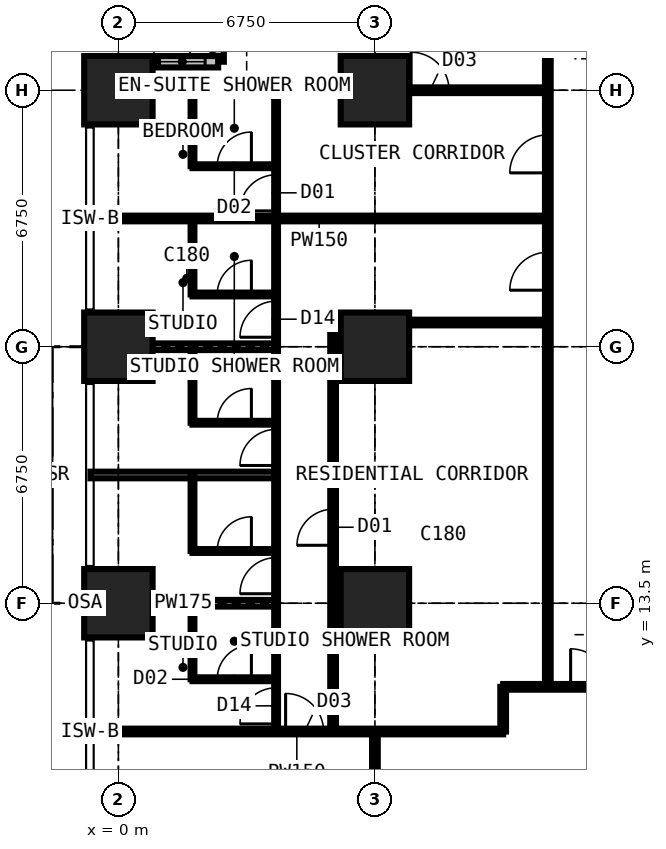
"""IFC4 building model, lengths in metres.
Left out: names, types, materials, properties, quantities, classifications, styles, units other than length and angle.
Written with IfcOpenShell. Run it as: python <this file> out.ifc"""

import sys

from ifc_helpers import new_model, si_unit, direction, frame, frame_2d, origin, origin_2d, place, context, subcontext, project, spatial, rectangle, extrude, element, fill, save


model = new_model("IFC4")
c1 = context("Model", 3, precision=1e-05, world=origin(), true_north=direction((0.0, 1.0)))
c2 = subcontext(c1, "Body", "Model", "MODEL_VIEW")
j1 = project(units=[si_unit("LENGTHUNIT", "METRE"), si_unit("PLANEANGLEUNIT", "RADIAN")], contexts=[c1])
p1 = place(None, origin())
s1 = spatial("IfcSite", under=j1, at=p1, CompositionType="ELEMENT")
p2 = place(p1, origin())
s2 = spatial("IfcBuilding", under=s1, at=p2, CompositionType="ELEMENT")
p3 = place(p2, frame((0.0, 0.0, 105.3)))
s3 = spatial("IfcBuildingStorey", under=s2, at=p3, CompositionType="ELEMENT", Elevation=105.3)
for number, where, z_axis, x_axis in (
    (1, (0.0, 13.5, 0.0), (0.0, 0.0, 1.0), (1.0, 0.0, 0.0)),
    (2, (0.0, 20.25, 0.0), (0.0, 0.0, 1.0), (1.0, 0.0, 0.0)),
    (3, (0.0, 27.0, 0.0), (0.0, 0.0, 1.0), (1.0, 0.0, 0.0)),
    (4, (6.75, 13.5, 0.0), (0.0, 0.0, 1.0), (1.0, 0.0, 0.0)),
    (5, (6.75, 20.25, 0.0), (0.0, 0.0, 1.0), (1.0, 0.0, 0.0)),
    (6, (6.75, 27.0, 0.0), (0.0, 0.0, 1.0), (1.0, 0.0, 0.0)),
):
    element("IfcColumn", number, at=place(p3, frame(where, z_axis=z_axis, x_axis=x_axis)), inside=s3, PredefinedType="COLUMN", context=c2, shape_type="SweptSolid", body=[
        extrude(rectangle(XDim=1.8, YDim=1.8, at=origin_2d()), origin(), (0.0, 0.0, 1.0), 3.6),
    ])
p4 = place(p3, frame((2.625, 31.125, 0.0), z_axis=(0.0, 0.0, 1.0), x_axis=(0.0, -1.0, 0.0)))
e7 = element("IfcWall", 7, at=p4, inside=s3, PredefinedType="SOLIDWALL", context=c2, shape_type="SweptSolid", body=[
    extrude(rectangle(XDim=3.375, YDim=0.3, at=frame_2d((1.688, 0.0))), origin(), (0.0, 0.0, 1.0), 3.375),
])
p5 = place(p4, frame((0.788, 0.0, 0.6)))
e8 = element("IfcOpeningElement", 8, at=p5, cuts=e7, PredefinedType="OPENING", context=c2, shape_type="SweptSolid", body=[
    extrude(rectangle(XDim=1.8, YDim=2.1, at=frame_2d((0.9, 1.05))), frame((0.0, 0.16, 0.0), z_axis=(0.0, -1.0, 0.0), x_axis=(1.0, 0.0, 0.0)), (0.0, 0.0, 1.0), 0.32),
])
p6 = place(p3, frame((2.625, 27.75, 0.0), z_axis=(0.0, 0.0, 1.0), x_axis=(-1.0, 0.0, 0.0)))
e9 = element("IfcWall", 9, at=p6, inside=s3, PredefinedType="SOLIDWALL", context=c2, shape_type="SweptSolid", body=[
    extrude(rectangle(XDim=3.375, YDim=0.3, at=frame_2d((1.688, 0.0))), origin(), (0.0, 0.0, 1.0), 3.375),
])
p7 = place(p6, frame((0.343, 0.0, 0.9)))
e10 = element("IfcOpeningElement", 10, at=p7, cuts=e9, PredefinedType="OPENING", context=c2, shape_type="SweptSolid", body=[
    extrude(rectangle(XDim=1.2, YDim=1.8, at=frame_2d((0.6, 0.9))), frame((0.0, 0.16, 0.0), z_axis=(0.0, -1.0, 0.0), x_axis=(1.0, 0.0, 0.0)), (0.0, 0.0, 1.0), 0.32),
])
p8 = place(p3, frame((-0.734, 10.125, 0.0), z_axis=(0.0, 0.0, 1.0), x_axis=(1.0, 0.0, 0.0)))
e11 = element("IfcWall", 11, at=p8, inside=s3, PredefinedType="PARTITIONING", context=c2, shape_type="SweptSolid", body=[
    extrude(rectangle(XDim=10.859, YDim=0.15, at=frame_2d((5.429, 0.0))), origin(), (0.0, 0.0, 1.0), 3.375),
])
p9 = place(p8, frame((5.134, 0.0, 0.0)))
e12 = element("IfcOpeningElement", 12, at=p9, cuts=e11, PredefinedType="OPENING", context=c2, shape_type="SweptSolid", body=[
    extrude(rectangle(XDim=1.0, YDim=2.2, at=frame_2d((0.5, 1.1))), frame((0.0, 0.085, 0.0), z_axis=(0.0, -1.0, 0.0), x_axis=(1.0, 0.0, 0.0)), (0.0, 0.0, 1.0), 0.17),
])
p10 = place(p3, frame((-0.734, 13.5, 0.0), z_axis=(0.0, 0.0, 1.0), x_axis=(1.0, 0.0, 0.0)))
e13 = element("IfcWall", 13, at=p10, inside=s3, PredefinedType="PARTITIONING", context=c2, shape_type="SweptSolid", body=[
    extrude(rectangle(XDim=4.884, YDim=0.175, at=frame_2d((2.442, 0.0))), origin(), (0.0, 0.0, 1.0), 2.61),
])
p11 = place(p3, frame((-0.734, 16.875, 0.0), z_axis=(0.0, 0.0, 1.0), x_axis=(1.0, 0.0, 0.0)))
e14 = element("IfcWall", 14, at=p11, inside=s3, PredefinedType="PARTITIONING", context=c2, shape_type="SweptSolid", body=[
    extrude(rectangle(XDim=4.884, YDim=0.175, at=frame_2d((2.442, 0.0))), origin(), (0.0, 0.0, 1.0), 3.375),
])
p12 = place(p3, frame((-0.734, 20.25, 0.0), z_axis=(0.0, 0.0, 1.0), x_axis=(1.0, 0.0, 0.0)))
e15 = element("IfcWall", 15, at=p12, inside=s3, PredefinedType="PARTITIONING", context=c2, shape_type="SweptSolid", body=[
    extrude(rectangle(XDim=4.884, YDim=0.175, at=frame_2d((2.442, 0.0))), origin(), (0.0, 0.0, 1.0), 2.61),
])
p13 = place(p3, frame((-0.734, 23.625, 0.0), z_axis=(0.0, 0.0, 1.0), x_axis=(1.0, 0.0, 0.0)))
e16 = element("IfcWall", 16, at=p13, inside=s3, PredefinedType="PARTITIONING", context=c2, shape_type="SweptSolid", body=[
    extrude(rectangle(XDim=12.034, YDim=0.15, at=frame_2d((6.017, 0.0))), origin(), (0.0, 0.0, 1.0), 3.375),
])
p14 = place(p3, frame((-0.734, 27.0, 0.0), z_axis=(0.0, 0.0, 1.0), x_axis=(1.0, 0.0, 0.0)))
e17 = element("IfcWall", 17, at=p14, inside=s3, PredefinedType="PARTITIONING", context=c2, shape_type="SweptSolid", body=[
    extrude(rectangle(XDim=12.034, YDim=0.15, at=frame_2d((6.017, 0.0))), origin(), (0.0, 0.0, 1.0), 2.806),
])
p15 = place(p14, frame((8.434, 0.0, 0.0)))
e18 = element("IfcOpeningElement", 18, at=p15, cuts=e17, PredefinedType="OPENING", context=c2, shape_type="SweptSolid", body=[
    extrude(rectangle(XDim=1.0, YDim=2.2, at=frame_2d((0.5, 1.1))), frame((0.0, 0.085, 0.0), z_axis=(0.0, -1.0, 0.0), x_axis=(1.0, 0.0, 0.0)), (0.0, 0.0, 1.0), 0.17),
])
p16 = place(p3, frame((1.95, 11.5, 0.0), z_axis=(0.0, 0.0, 1.0), x_axis=(0.0, 1.0, 0.0)))
e19 = element("IfcWall", 19, at=p16, inside=s3, PredefinedType="PARTITIONING", context=c2, shape_type="SweptSolid", body=[
    extrude(rectangle(XDim=2.0, YDim=0.1, at=frame_2d((1.0, 0.0))), origin(), (0.0, 0.0, 1.0), 3.375),
])
p17 = place(p3, frame((1.95, 11.5, 0.0), z_axis=(0.0, 0.0, 1.0), x_axis=(1.0, 0.0, 0.0)))
e20 = element("IfcWall", 20, at=p17, inside=s3, PredefinedType="PARTITIONING", context=c2, shape_type="SweptSolid", body=[
    extrude(rectangle(XDim=2.2, YDim=0.1, at=frame_2d((1.1, 0.0))), origin(), (0.0, 0.0, 1.0), 3.375),
])
p18 = place(p17, frame((0.65, 0.0, 0.0)))
e21 = element("IfcOpeningElement", 21, at=p18, cuts=e20, PredefinedType="OPENING", context=c2, shape_type="SweptSolid", body=[
    extrude(rectangle(XDim=0.9, YDim=2.2, at=frame_2d((0.45, 1.1))), frame((0.0, 0.06, 0.0), z_axis=(0.0, -1.0, 0.0), x_axis=(1.0, 0.0, 0.0)), (0.0, 0.0, 1.0), 0.12),
])
p19 = place(p3, frame((1.95, 14.875, 0.0), z_axis=(0.0, 0.0, 1.0), x_axis=(0.0, 1.0, 0.0)))
e22 = element("IfcWall", 22, at=p19, inside=s3, PredefinedType="PARTITIONING", context=c2, shape_type="SweptSolid", body=[
    extrude(rectangle(XDim=2.0, YDim=0.1, at=frame_2d((1.0, 0.0))), origin(), (0.0, 0.0, 1.0), 3.375),
])
p20 = place(p3, frame((1.95, 14.875, 0.0), z_axis=(0.0, 0.0, 1.0), x_axis=(1.0, 0.0, 0.0)))
e23 = element("IfcWall", 23, at=p20, inside=s3, PredefinedType="PARTITIONING", context=c2, shape_type="SweptSolid", body=[
    extrude(rectangle(XDim=2.2, YDim=0.1, at=frame_2d((1.1, 0.0))), origin(), (0.0, 0.0, 1.0), 3.375),
])
p21 = place(p20, frame((0.65, 0.0, 0.0)))
e24 = element("IfcOpeningElement", 24, at=p21, cuts=e23, PredefinedType="OPENING", context=c2, shape_type="SweptSolid", body=[
    extrude(rectangle(XDim=0.9, YDim=2.2, at=frame_2d((0.45, 1.1))), frame((0.0, 0.06, 0.0), z_axis=(0.0, -1.0, 0.0), x_axis=(1.0, 0.0, 0.0)), (0.0, 0.0, 1.0), 0.12),
])
p22 = place(p3, frame((1.95, 18.25, 0.0), z_axis=(0.0, 0.0, 1.0), x_axis=(0.0, 1.0, 0.0)))
e25 = element("IfcWall", 25, at=p22, inside=s3, PredefinedType="PARTITIONING", context=c2, shape_type="SweptSolid", body=[
    extrude(rectangle(XDim=2.0, YDim=0.1, at=frame_2d((1.0, 0.0))), origin(), (0.0, 0.0, 1.0), 3.375),
])
p23 = place(p3, frame((1.95, 18.25, 0.0), z_axis=(0.0, 0.0, 1.0), x_axis=(1.0, 0.0, 0.0)))
e26 = element("IfcWall", 26, at=p23, inside=s3, PredefinedType="PARTITIONING", context=c2, shape_type="SweptSolid", body=[
    extrude(rectangle(XDim=2.2, YDim=0.1, at=frame_2d((1.1, 0.0))), origin(), (0.0, 0.0, 1.0), 3.375),
])
p24 = place(p23, frame((0.65, 0.0, 0.0)))
e27 = element("IfcOpeningElement", 27, at=p24, cuts=e26, PredefinedType="OPENING", context=c2, shape_type="SweptSolid", body=[
    extrude(rectangle(XDim=0.9, YDim=2.2, at=frame_2d((0.45, 1.1))), frame((0.0, 0.06, 0.0), z_axis=(0.0, -1.0, 0.0), x_axis=(1.0, 0.0, 0.0)), (0.0, 0.0, 1.0), 0.12),
])
p25 = place(p3, frame((1.95, 21.625, 0.0), z_axis=(0.0, 0.0, 1.0), x_axis=(0.0, 1.0, 0.0)))
e28 = element("IfcWall", 28, at=p25, inside=s3, PredefinedType="PARTITIONING", context=c2, shape_type="SweptSolid", body=[
    extrude(rectangle(XDim=2.0, YDim=0.1, at=frame_2d((1.0, 0.0))), origin(), (0.0, 0.0, 1.0), 3.375),
])
p26 = place(p3, frame((1.95, 21.625, 0.0), z_axis=(0.0, 0.0, 1.0), x_axis=(1.0, 0.0, 0.0)))
e29 = element("IfcWall", 29, at=p26, inside=s3, PredefinedType="PARTITIONING", context=c2, shape_type="SweptSolid", body=[
    extrude(rectangle(XDim=2.2, YDim=0.1, at=frame_2d((1.1, 0.0))), origin(), (0.0, 0.0, 1.0), 3.375),
])
p27 = place(p26, frame((0.65, 0.0, 0.0)))
e30 = element("IfcOpeningElement", 30, at=p27, cuts=e29, PredefinedType="OPENING", context=c2, shape_type="SweptSolid", body=[
    extrude(rectangle(XDim=0.9, YDim=2.2, at=frame_2d((0.45, 1.1))), frame((0.0, 0.06, 0.0), z_axis=(0.0, -1.0, 0.0), x_axis=(1.0, 0.0, 0.0)), (0.0, 0.0, 1.0), 0.12),
])
p28 = place(p3, frame((1.95, 25.0, 0.0), z_axis=(0.0, 0.0, 1.0), x_axis=(0.0, 1.0, 0.0)))
e31 = element("IfcWall", 31, at=p28, inside=s3, PredefinedType="PARTITIONING", context=c2, shape_type="SweptSolid", body=[
    extrude(rectangle(XDim=2.0, YDim=0.1, at=frame_2d((1.0, 0.0))), origin(), (0.0, 0.0, 1.0), 3.375),
])
p29 = place(p3, frame((1.95, 25.0, 0.0), z_axis=(0.0, 0.0, 1.0), x_axis=(1.0, 0.0, 0.0)))
e32 = element("IfcWall", 32, at=p29, inside=s3, PredefinedType="PARTITIONING", context=c2, shape_type="SweptSolid", body=[
    extrude(rectangle(XDim=2.2, YDim=0.1, at=frame_2d((1.1, 0.0))), origin(), (0.0, 0.0, 1.0), 3.375),
])
p30 = place(p29, frame((0.65, 0.0, 0.0)))
e33 = element("IfcOpeningElement", 33, at=p30, cuts=e32, PredefinedType="OPENING", context=c2, shape_type="SweptSolid", body=[
    extrude(rectangle(XDim=0.9, YDim=2.2, at=frame_2d((0.45, 1.1))), frame((0.0, 0.06, 0.0), z_axis=(0.0, -1.0, 0.0), x_axis=(1.0, 0.0, 0.0)), (0.0, 0.0, 1.0), 0.12),
])
p31 = place(p3, frame((4.15, 10.125, 0.0), z_axis=(0.0, 0.0, 1.0), x_axis=(0.0, 1.0, 0.0)))
e34 = element("IfcWall", 34, at=p31, inside=s3, PredefinedType="PARTITIONING", context=c2, shape_type="SweptSolid", body=[
    extrude(rectangle(XDim=16.875, YDim=0.1, at=frame_2d((8.438, 0.0))), origin(), (0.0, 0.0, 1.0), 3.375),
])
p32 = place(p31, frame((13.7, 0.0, 0.0)))
e35 = element("IfcOpeningElement", 35, at=p32, cuts=e34, PredefinedType="OPENING", context=c2, shape_type="SweptSolid", body=[
    extrude(rectangle(XDim=0.95, YDim=2.2, at=frame_2d((0.475, 1.1))), frame((0.0, 0.06, 0.0), z_axis=(0.0, -1.0, 0.0), x_axis=(1.0, 0.0, 0.0)), (0.0, 0.0, 1.0), 0.12),
])
p33 = place(p31, frame((0.2, 0.0, 0.0)))
e36 = element("IfcOpeningElement", 36, at=p33, cuts=e34, PredefinedType="OPENING", context=c2, shape_type="SweptSolid", body=[
    extrude(rectangle(XDim=0.95, YDim=2.2, at=frame_2d((0.475, 1.1))), frame((0.0, 0.06, 0.0), z_axis=(0.0, -1.0, 0.0), x_axis=(1.0, 0.0, 0.0)), (0.0, 0.0, 1.0), 0.12),
])
p34 = place(p31, frame((3.625, 0.0, 0.0)))
e37 = element("IfcOpeningElement", 37, at=p34, cuts=e34, PredefinedType="OPENING", context=c2, shape_type="SweptSolid", body=[
    extrude(rectangle(XDim=0.95, YDim=2.2, at=frame_2d((0.475, 1.1))), frame((0.0, 0.06, 0.0), z_axis=(0.0, -1.0, 0.0), x_axis=(1.0, 0.0, 0.0)), (0.0, 0.0, 1.0), 0.12),
])
p35 = place(p31, frame((7.0, 0.0, 0.0)))
e38 = element("IfcOpeningElement", 38, at=p35, cuts=e34, PredefinedType="OPENING", context=c2, shape_type="SweptSolid", body=[
    extrude(rectangle(XDim=0.95, YDim=2.2, at=frame_2d((0.475, 1.1))), frame((0.0, 0.06, 0.0), z_axis=(0.0, -1.0, 0.0), x_axis=(1.0, 0.0, 0.0)), (0.0, 0.0, 1.0), 0.12),
])
p36 = place(p31, frame((10.375, 0.0, 0.0)))
e39 = element("IfcOpeningElement", 39, at=p36, cuts=e34, PredefinedType="OPENING", context=c2, shape_type="SweptSolid", body=[
    extrude(rectangle(XDim=0.95, YDim=2.2, at=frame_2d((0.475, 1.1))), frame((0.0, 0.06, 0.0), z_axis=(0.0, -1.0, 0.0), x_axis=(1.0, 0.0, 0.0)), (0.0, 0.0, 1.0), 0.12),
])
p37 = place(p3, frame((5.65, 10.125, 0.0), z_axis=(0.0, 0.0, 1.0), x_axis=(0.0, 1.0, 0.0)))
e40 = element("IfcWall", 40, at=p37, inside=s3, PredefinedType="PARTITIONING", context=c2, shape_type="SweptSolid", body=[
    extrude(rectangle(XDim=10.762, YDim=0.15, at=frame_2d((5.381, 0.0))), origin(), (0.0, 0.0, 1.0), 3.375),
])
p38 = place(p37, frame((4.9, 0.0, 0.0)))
e41 = element("IfcOpeningElement", 41, at=p38, cuts=e40, PredefinedType="OPENING", context=c2, shape_type="SweptSolid", body=[
    extrude(rectangle(XDim=0.95, YDim=2.2, at=frame_2d((0.475, 1.1))), frame((0.0, 0.085, 0.0), z_axis=(0.0, -1.0, 0.0), x_axis=(1.0, 0.0, 0.0)), (0.0, 0.0, 1.0), 0.17),
])
p39 = place(p3, frame((5.65, 20.887, 0.0), z_axis=(0.0, 0.0, 1.0), x_axis=(1.0, 0.0, 0.0)))
e42 = element("IfcWall", 42, at=p39, inside=s3, PredefinedType="PARTITIONING", context=c2, shape_type="SweptSolid", body=[
    extrude(rectangle(XDim=5.65, YDim=0.15, at=frame_2d((2.825, 0.0))), origin(), (0.0, 0.0, 1.0), 3.375),
])
p40 = place(p3, frame((6.75, -0.734, 0.0), z_axis=(0.0, 0.0, 1.0), x_axis=(0.0, 1.0, 0.0)))
e43 = element("IfcWall", 43, at=p40, inside=s3, PredefinedType="PARTITIONING", context=c2, shape_type="SweptSolid", body=[
    extrude(rectangle(XDim=10.859, YDim=0.15, at=frame_2d((5.429, 0.0))), origin(), (0.0, 0.0, 1.0), 2.877),
])
p41 = place(p3, frame((10.125, 10.125, 0.0), z_axis=(0.0, 0.0, 1.0), x_axis=(0.0, 1.0, 0.0)))
e44 = element("IfcWall", 44, at=p41, inside=s3, PredefinedType="PARTITIONING", context=c2, shape_type="SweptSolid", body=[
    extrude(rectangle(XDim=1.175, YDim=0.15, at=frame_2d((0.587, 0.0))), origin(), (0.0, 0.0, 1.0), 3.375),
])
p42 = place(p3, frame((10.125, 11.3, 0.0), z_axis=(0.0, 0.0, 1.0), x_axis=(1.0, 0.0, 0.0)))
e45 = element("IfcWall", 45, at=p42, inside=s3, PredefinedType="PARTITIONING", context=c2, shape_type="SweptSolid", body=[
    extrude(rectangle(XDim=20.675, YDim=0.15, at=frame_2d((10.337, 0.0))), origin(), (0.0, 0.0, 1.0), 3.375),
])
p43 = place(p42, frame((1.775, 0.0, 0.0)))
e46 = element("IfcOpeningElement", 46, at=p43, cuts=e45, PredefinedType="OPENING", context=c2, shape_type="SweptSolid", body=[
    extrude(rectangle(XDim=1.0, YDim=2.2, at=frame_2d((0.5, 1.1))), frame((0.0, 0.085, 0.0), z_axis=(0.0, -1.0, 0.0), x_axis=(1.0, 0.0, 0.0)), (0.0, 0.0, 1.0), 0.17),
])
p44 = place(p42, frame((11.312, 0.0, 0.0)))
e47 = element("IfcOpeningElement", 47, at=p44, cuts=e45, PredefinedType="OPENING", context=c2, shape_type="SweptSolid", body=[
    extrude(rectangle(XDim=1.0, YDim=2.2, at=frame_2d((0.5, 1.1))), frame((0.0, 0.085, 0.0), z_axis=(0.0, -1.0, 0.0), x_axis=(1.0, 0.0, 0.0)), (0.0, 0.0, 1.0), 0.17),
])
p45 = place(p3, frame((11.3, 11.3, 0.0), z_axis=(0.0, 0.0, 1.0), x_axis=(0.0, 1.0, 0.0)))
e48 = element("IfcWall", 48, at=p45, inside=s3, PredefinedType="PARTITIONING", context=c2, shape_type="SweptSolid", body=[
    extrude(rectangle(XDim=19.3, YDim=0.15, at=frame_2d((9.65, 0.0))), origin(), (0.0, 0.0, 1.0), 3.375),
])
p46 = place(p45, frame((13.525, 0.0, 0.0)))
e49 = element("IfcOpeningElement", 49, at=p46, cuts=e48, PredefinedType="OPENING", context=c2, shape_type="SweptSolid", body=[
    extrude(rectangle(XDim=1.0, YDim=2.2, at=frame_2d((0.5, 1.1))), frame((0.0, 0.085, 0.0), z_axis=(0.0, -1.0, 0.0), x_axis=(1.0, 0.0, 0.0)), (0.0, 0.0, 1.0), 0.17),
])
p47 = place(p45, frame((10.438, 0.0, 0.0)))
e50 = element("IfcOpeningElement", 50, at=p47, cuts=e48, PredefinedType="OPENING", context=c2, shape_type="SweptSolid", body=[
    extrude(rectangle(XDim=1.0, YDim=2.2, at=frame_2d((0.5, 1.1))), frame((0.0, 0.085, 0.0), z_axis=(0.0, -1.0, 0.0), x_axis=(1.0, 0.0, 0.0)), (0.0, 0.0, 1.0), 0.17),
])
p48 = place(p7, origin())
e51 = element("IfcWindow", 51, at=p48, inside=s3, PartitioningType="SINGLE_PANEL", PredefinedType="WINDOW", context=c2, shape_type="SweptSolid", body=[
    extrude(rectangle(XDim=1.2, YDim=1.8, at=frame_2d((0.6, 0.9))), frame((0.0, 0.03, 0.0), z_axis=(0.0, -1.0, 0.0), x_axis=(1.0, 0.0, 0.0)), (0.0, 0.0, 1.0), 0.06),
])
fill(e10, e51)
p49 = place(p9, origin())
e52 = element("IfcDoor", 52, at=p49, inside=s3, OperationType="SINGLE_SWING_LEFT", PredefinedType="DOOR", context=c2, shape_type="SweptSolid", body=[
    extrude(rectangle(XDim=1.0, YDim=2.2, at=frame_2d((0.5, 1.1))), frame((0.0, 0.025, 0.0), z_axis=(0.0, -1.0, 0.0), x_axis=(1.0, 0.0, 0.0)), (0.0, 0.0, 1.0), 0.05),
])
fill(e12, e52)
p50 = place(p43, origin())
e53 = element("IfcDoor", 53, at=p50, inside=s3, OperationType="SINGLE_SWING_LEFT", PredefinedType="DOOR", context=c2, shape_type="SweptSolid", body=[
    extrude(rectangle(XDim=1.0, YDim=2.2, at=frame_2d((0.5, 1.1))), frame((0.0, 0.025, 0.0), z_axis=(0.0, -1.0, 0.0), x_axis=(1.0, 0.0, 0.0)), (0.0, 0.0, 1.0), 0.05),
])
fill(e46, e53)
p51 = place(p15, origin())
e54 = element("IfcDoor", 54, at=p51, inside=s3, OperationType="SINGLE_SWING_LEFT", PredefinedType="DOOR", context=c2, shape_type="SweptSolid", body=[
    extrude(rectangle(XDim=1.0, YDim=2.2, at=frame_2d((0.5, 1.1))), frame((0.0, 0.025, 0.0), z_axis=(0.0, -1.0, 0.0), x_axis=(1.0, 0.0, 0.0)), (0.0, 0.0, 1.0), 0.05),
])
fill(e18, e54)
p52 = place(p32, origin())
e55 = element("IfcDoor", 55, at=p52, inside=s3, OperationType="SINGLE_SWING_LEFT", PredefinedType="DOOR", context=c2, shape_type="SweptSolid", body=[
    extrude(rectangle(XDim=0.95, YDim=2.2, at=frame_2d((0.475, 1.1))), frame((0.0, 0.025, 0.0), z_axis=(0.0, -1.0, 0.0), x_axis=(1.0, 0.0, 0.0)), (0.0, 0.0, 1.0), 0.05),
])
fill(e35, e55)
p53 = place(p30, origin())
e56 = element("IfcDoor", 56, at=p53, inside=s3, OperationType="SINGLE_SWING_RIGHT", PredefinedType="DOOR", context=c2, shape_type="SweptSolid", body=[
    extrude(rectangle(XDim=0.9, YDim=2.2, at=frame_2d((0.45, 1.1))), frame((0.0, 0.025, 0.0), z_axis=(0.0, -1.0, 0.0), x_axis=(1.0, 0.0, 0.0)), (0.0, 0.0, 1.0), 0.05),
])
fill(e33, e56)
p54 = place(p46, origin())
e57 = element("IfcDoor", 57, at=p54, inside=s3, OperationType="SINGLE_SWING_LEFT", PredefinedType="DOOR", context=c2, shape_type="SweptSolid", body=[
    extrude(rectangle(XDim=1.0, YDim=2.2, at=frame_2d((0.5, 1.1))), frame((0.0, 0.025, 0.0), z_axis=(0.0, -1.0, 0.0), x_axis=(1.0, 0.0, 0.0)), (0.0, 0.0, 1.0), 0.05),
])
fill(e49, e57)
p55 = place(p33, origin())
e58 = element("IfcDoor", 58, at=p55, inside=s3, OperationType="SINGLE_SWING_LEFT", PredefinedType="DOOR", context=c2, shape_type="SweptSolid", body=[
    extrude(rectangle(XDim=0.95, YDim=2.2, at=frame_2d((0.475, 1.1))), frame((0.0, 0.025, 0.0), z_axis=(0.0, -1.0, 0.0), x_axis=(1.0, 0.0, 0.0)), (0.0, 0.0, 1.0), 0.05),
])
fill(e36, e58)
p56 = place(p18, origin())
e59 = element("IfcDoor", 59, at=p56, inside=s3, OperationType="SINGLE_SWING_RIGHT", PredefinedType="DOOR", context=c2, shape_type="SweptSolid", body=[
    extrude(rectangle(XDim=0.9, YDim=2.2, at=frame_2d((0.45, 1.1))), frame((0.0, 0.025, 0.0), z_axis=(0.0, -1.0, 0.0), x_axis=(1.0, 0.0, 0.0)), (0.0, 0.0, 1.0), 0.05),
])
fill(e21, e59)
p57 = place(p34, origin())
e60 = element("IfcDoor", 60, at=p57, inside=s3, OperationType="SINGLE_SWING_LEFT", PredefinedType="DOOR", context=c2, shape_type="SweptSolid", body=[
    extrude(rectangle(XDim=0.95, YDim=2.2, at=frame_2d((0.475, 1.1))), frame((0.0, 0.025, 0.0), z_axis=(0.0, -1.0, 0.0), x_axis=(1.0, 0.0, 0.0)), (0.0, 0.0, 1.0), 0.05),
])
fill(e37, e60)
p58 = place(p21, origin())
e61 = element("IfcDoor", 61, at=p58, inside=s3, OperationType="SINGLE_SWING_RIGHT", PredefinedType="DOOR", context=c2, shape_type="SweptSolid", body=[
    extrude(rectangle(XDim=0.9, YDim=2.2, at=frame_2d((0.45, 1.1))), frame((0.0, 0.025, 0.0), z_axis=(0.0, -1.0, 0.0), x_axis=(1.0, 0.0, 0.0)), (0.0, 0.0, 1.0), 0.05),
])
fill(e24, e61)
p59 = place(p35, origin())
e62 = element("IfcDoor", 62, at=p59, inside=s3, OperationType="SINGLE_SWING_LEFT", PredefinedType="DOOR", context=c2, shape_type="SweptSolid", body=[
    extrude(rectangle(XDim=0.95, YDim=2.2, at=frame_2d((0.475, 1.1))), frame((0.0, 0.025, 0.0), z_axis=(0.0, -1.0, 0.0), x_axis=(1.0, 0.0, 0.0)), (0.0, 0.0, 1.0), 0.05),
])
fill(e38, e62)
p60 = place(p24, origin())
e63 = element("IfcDoor", 63, at=p60, inside=s3, OperationType="SINGLE_SWING_RIGHT", PredefinedType="DOOR", context=c2, shape_type="SweptSolid", body=[
    extrude(rectangle(XDim=0.9, YDim=2.2, at=frame_2d((0.45, 1.1))), frame((0.0, 0.025, 0.0), z_axis=(0.0, -1.0, 0.0), x_axis=(1.0, 0.0, 0.0)), (0.0, 0.0, 1.0), 0.05),
])
fill(e27, e63)
p61 = place(p36, origin())
e64 = element("IfcDoor", 64, at=p61, inside=s3, OperationType="SINGLE_SWING_LEFT", PredefinedType="DOOR", context=c2, shape_type="SweptSolid", body=[
    extrude(rectangle(XDim=0.95, YDim=2.2, at=frame_2d((0.475, 1.1))), frame((0.0, 0.025, 0.0), z_axis=(0.0, -1.0, 0.0), x_axis=(1.0, 0.0, 0.0)), (0.0, 0.0, 1.0), 0.05),
])
fill(e39, e64)
p62 = place(p27, origin())
e65 = element("IfcDoor", 65, at=p62, inside=s3, OperationType="SINGLE_SWING_RIGHT", PredefinedType="DOOR", context=c2, shape_type="SweptSolid", body=[
    extrude(rectangle(XDim=0.9, YDim=2.2, at=frame_2d((0.45, 1.1))), frame((0.0, 0.025, 0.0), z_axis=(0.0, -1.0, 0.0), x_axis=(1.0, 0.0, 0.0)), (0.0, 0.0, 1.0), 0.05),
])
fill(e30, e65)
p63 = place(p47, origin())
e66 = element("IfcDoor", 66, at=p63, inside=s3, OperationType="SINGLE_SWING_LEFT", PredefinedType="DOOR", context=c2, shape_type="SweptSolid", body=[
    extrude(rectangle(XDim=1.0, YDim=2.2, at=frame_2d((0.5, 1.1))), frame((0.0, 0.025, 0.0), z_axis=(0.0, -1.0, 0.0), x_axis=(1.0, 0.0, 0.0)), (0.0, 0.0, 1.0), 0.05),
])
fill(e50, e66)
p64 = place(p38, origin())
e67 = element("IfcDoor", 67, at=p64, inside=s3, OperationType="SINGLE_SWING_LEFT", PredefinedType="DOOR", context=c2, shape_type="SweptSolid", body=[
    extrude(rectangle(XDim=0.95, YDim=2.2, at=frame_2d((0.475, 1.1))), frame((0.0, 0.025, 0.0), z_axis=(0.0, -1.0, 0.0), x_axis=(1.0, 0.0, 0.0)), (0.0, 0.0, 1.0), 0.05),
])
fill(e41, e67)
save(model, sys.argv[1])
